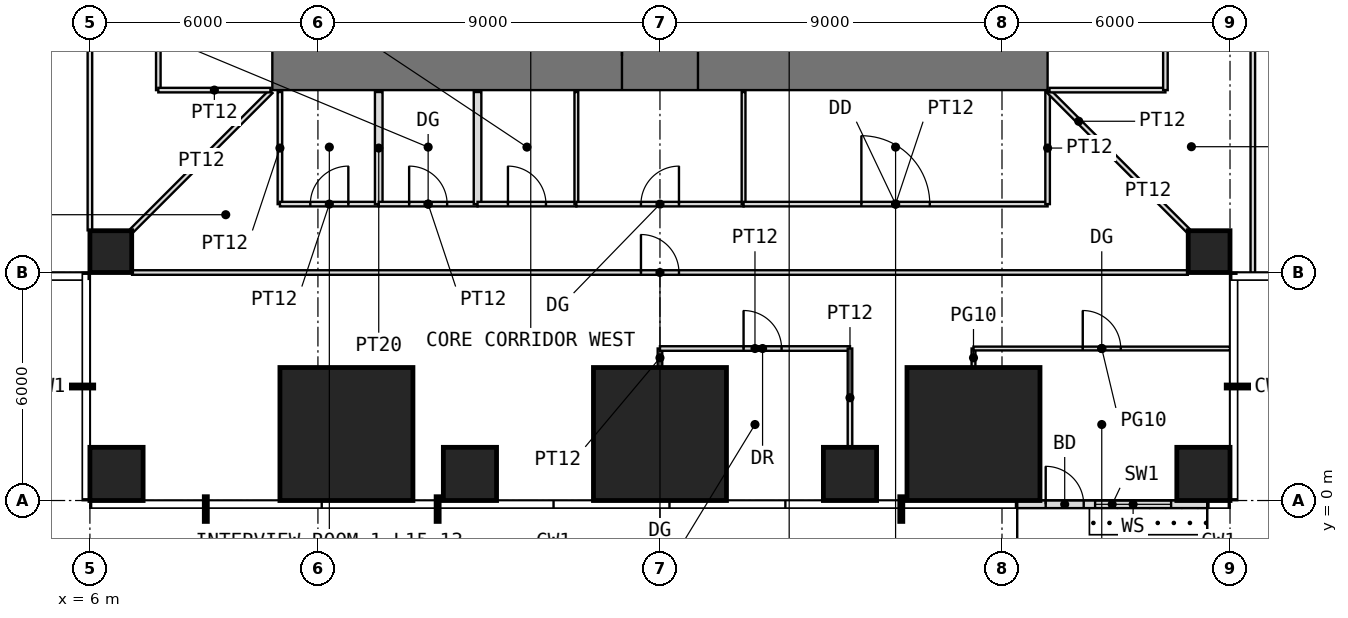
"""IFC4 building model, lengths in metres.
Left out: names, types, materials, properties, quantities, classifications, styles, units other than length and angle.
Written with IfcOpenShell. Run it as: python <this file> out.ifc"""

import sys

from ifc_helpers import new_model, si_unit, direction, frame, frame_2d, origin, origin_2d, place, context, subcontext, project, spatial, rectangle, extrude, element, fill, save


model = new_model("IFC4")
c1 = context("Model", 3, precision=1e-05, world=origin(), true_north=direction((0.0, 1.0)))
c2 = subcontext(c1, "Body", "Model", "MODEL_VIEW")
j1 = project(units=[si_unit("LENGTHUNIT", "METRE"), si_unit("PLANEANGLEUNIT", "RADIAN")], contexts=[c1])
p1 = place(None, origin())
s1 = spatial("IfcSite", under=j1, at=p1, CompositionType="ELEMENT")
p2 = place(p1, origin())
s2 = spatial("IfcBuilding", under=s1, at=p2, CompositionType="ELEMENT")
p3 = place(p2, frame((0.0, 0.0, 66.5)))
s3 = spatial("IfcBuildingStorey", under=s2, at=p3, CompositionType="ELEMENT", Elevation=66.5)
p4 = place(p3, frame((6.7, 0.7, 0.0), z_axis=(0.0, 0.0, 1.0), x_axis=(1.0, 0.0, 0.0)))
e1 = element("IfcColumn", 1, at=p4, inside=s3, PredefinedType="COLUMN", context=c2, shape_type="SweptSolid", body=[
    extrude(rectangle(XDim=1.4, YDim=1.4, at=origin_2d()), origin(), (0.0, 0.0, 1.0), 4.0),
])
p5 = place(p3, frame((12.75, 1.75, 0.0), z_axis=(0.0, 0.0, 1.0), x_axis=(1.0, 0.0, 0.0)))
e2 = element("IfcColumn", 2, at=p5, inside=s3, PredefinedType="COLUMN", context=c2, shape_type="SweptSolid", body=[
    extrude(rectangle(XDim=3.5, YDim=3.5, at=origin_2d()), origin(), (0.0, 0.0, 1.0), 4.0),
])
p6 = place(p3, frame((16.0, 0.7, 0.0), z_axis=(0.0, 0.0, 1.0), x_axis=(1.0, 0.0, 0.0)))
e3 = element("IfcColumn", 3, at=p6, inside=s3, PredefinedType="COLUMN", context=c2, shape_type="SweptSolid", body=[
    extrude(rectangle(XDim=1.4, YDim=1.4, at=origin_2d()), origin(), (0.0, 0.0, 1.0), 4.0),
])
p7 = place(p3, frame((21.0, 1.75, 0.0), z_axis=(0.0, 0.0, 1.0), x_axis=(1.0, 0.0, 0.0)))
e4 = element("IfcColumn", 4, at=p7, inside=s3, PredefinedType="COLUMN", context=c2, shape_type="SweptSolid", body=[
    extrude(rectangle(XDim=3.5, YDim=3.5, at=origin_2d()), origin(), (0.0, 0.0, 1.0), 4.0),
])
p8 = place(p3, frame((26.0, 0.7, 0.0), z_axis=(0.0, 0.0, 1.0), x_axis=(1.0, 0.0, 0.0)))
e5 = element("IfcColumn", 5, at=p8, inside=s3, PredefinedType="COLUMN", context=c2, shape_type="SweptSolid", body=[
    extrude(rectangle(XDim=1.4, YDim=1.4, at=origin_2d()), origin(), (0.0, 0.0, 1.0), 4.0),
])
p9 = place(p3, frame((29.25, 1.75, 0.0), z_axis=(0.0, 0.0, 1.0), x_axis=(1.0, 0.0, 0.0)))
e6 = element("IfcColumn", 6, at=p9, inside=s3, PredefinedType="COLUMN", context=c2, shape_type="SweptSolid", body=[
    extrude(rectangle(XDim=3.5, YDim=3.5, at=origin_2d()), origin(), (0.0, 0.0, 1.0), 4.0),
])
p10 = place(p3, frame((35.3, 0.7, 0.0), z_axis=(0.0, 0.0, 1.0), x_axis=(1.0, 0.0, 0.0)))
e7 = element("IfcColumn", 7, at=p10, inside=s3, PredefinedType="COLUMN", context=c2, shape_type="SweptSolid", body=[
    extrude(rectangle(XDim=1.4, YDim=1.4, at=origin_2d()), origin(), (0.0, 0.0, 1.0), 4.0),
])
for number, where, z_axis, x_axis in (
    (8, (6.55, 6.55, 0.0), (0.0, 0.0, 1.0), (1.0, 0.0, 0.0)),
    (9, (35.45, 6.55, 0.0), (0.0, 0.0, 1.0), (1.0, 0.0, 0.0)),
):
    element("IfcColumn", number, at=place(p3, frame(where, z_axis=z_axis, x_axis=x_axis)), inside=s3, PredefinedType="COLUMN", context=c2, shape_type="SweptSolid", body=[
        extrude(rectangle(XDim=1.1, YDim=1.1, at=origin_2d()), origin(), (0.0, 0.0, 1.0), 4.0),
    ])
p11 = place(p3, frame((30.4, -0.1, 0.0), z_axis=(0.0, 0.0, 1.0), x_axis=(1.0, 0.0, 0.0)))
e10 = element("IfcWall", 10, at=p11, inside=s3, PredefinedType="USERDEFINED", context=c2, shape_type="SweptSolid", body=[
    extrude(rectangle(XDim=5.0, YDim=0.2, at=frame_2d((2.5, 0.0))), origin(), (0.0, 0.0, 1.0), 3.75),
])
p12 = place(p11, frame((0.75, 0.0, 0.0)))
e11 = element("IfcOpeningElement", 11, at=p12, cuts=e10, PredefinedType="OPENING", context=c2, shape_type="SweptSolid", body=[
    extrude(rectangle(XDim=1.0, YDim=2.4, at=frame_2d((0.5, 1.2))), frame((0.0, 0.11, 0.0), z_axis=(0.0, -1.0, 0.0), x_axis=(1.0, 0.0, 0.0)), (0.0, 0.0, 1.0), 0.22),
])
p13 = place(p11, frame((2.05, 0.0, 0.3)))
e12 = element("IfcOpeningElement", 12, at=p13, cuts=e10, PredefinedType="OPENING", context=c2, shape_type="SweptSolid", body=[
    extrude(rectangle(XDim=2.0, YDim=2.7, at=frame_2d((1.0, 1.35))), frame((0.0, 0.11, 0.0), z_axis=(0.0, -1.0, 0.0), x_axis=(1.0, 0.0, 0.0)), (0.0, 0.0, 1.0), 0.22),
])
p14 = place(p3, frame((10.8, 11.7, -0.05), z_axis=(0.0, 0.0, 1.0), x_axis=(1.0, 0.0, 0.0)))
e13 = element("IfcWall", 13, at=p14, inside=s3, PredefinedType="SHEAR", context=c2, shape_type="SweptSolid", body=[
    extrude(rectangle(XDim=20.4, YDim=1.8, at=frame_2d((10.2, 0.0))), origin(), (0.0, 0.0, 1.0), 4.0),
])
p15 = place(p14, frame((9.2, 0.0, 0.05)))
e14 = element("IfcOpeningElement", 14, at=p15, cuts=e13, PredefinedType="OPENING", context=c2, shape_type="SweptSolid", body=[
    extrude(rectangle(XDim=2.0, YDim=2.2, at=frame_2d((1.0, 1.1))), frame((0.0, 0.91, 0.0), z_axis=(0.0, -1.0, 0.0), x_axis=(1.0, 0.0, 0.0)), (0.0, 0.0, 1.0), 1.82),
])
p16 = place(p3, frame((6.0, 7.11, 0.0), z_axis=(0.0, 0.0, 1.0), x_axis=(0.0, 1.0, 0.0)))
e15 = element("IfcWall", 15, at=p16, inside=s3, PredefinedType="PARTITIONING", context=c2, shape_type="SweptSolid", body=[
    extrude(rectangle(XDim=27.78, YDim=0.12, at=frame_2d((13.89, 0.0))), origin(), (0.0, 0.0, 1.0), 3.75),
])
p17 = place(p16, frame((13.39, 0.0, 0.0)))
e16 = element("IfcOpeningElement", 16, at=p17, cuts=e15, PredefinedType="OPENING", context=c2, shape_type="SweptSolid", body=[
    extrude(rectangle(XDim=1.0, YDim=2.4, at=frame_2d((0.5, 1.2))), frame((0.0, 0.07, 0.0), z_axis=(0.0, -1.0, 0.0), x_axis=(1.0, 0.0, 0.0)), (0.0, 0.0, 1.0), 0.14),
])
p18 = place(p3, frame((7.11, 6.0, 0.0), z_axis=(0.0, 0.0, 1.0), x_axis=(1.0, 0.0, 0.0)))
e17 = element("IfcWall", 17, at=p18, inside=s3, PredefinedType="PARTITIONING", context=c2, shape_type="SweptSolid", body=[
    extrude(rectangle(XDim=27.78, YDim=0.12, at=frame_2d((13.89, 0.0))), origin(), (0.0, 0.0, 1.0), 3.75),
])
p19 = place(p18, frame((13.39, 0.0, 0.0)))
e18 = element("IfcOpeningElement", 18, at=p19, cuts=e17, PredefinedType="OPENING", context=c2, shape_type="SweptSolid", body=[
    extrude(rectangle(XDim=1.0, YDim=2.4, at=frame_2d((0.5, 1.2))), frame((0.0, 0.07, 0.0), z_axis=(0.0, -1.0, 0.0), x_axis=(1.0, 0.0, 0.0)), (0.0, 0.0, 1.0), 0.14),
])
p20 = place(p3, frame((7.11, 7.11, 0.0), z_axis=(0.0, 0.0, 1.0), x_axis=(0.707106781187, 0.707106781187, 0.0)))
e19 = element("IfcWall", 19, at=p20, inside=s3, PredefinedType="PARTITIONING", context=c2, shape_type="SweptSolid", body=[
    extrude(rectangle(XDim=5.168, YDim=0.12, at=frame_2d((2.584, 0.0))), origin(), (0.0, 0.0, 1.0), 3.75),
])
p21 = place(p3, frame((7.8, 10.8, 0.0), z_axis=(0.0, 0.0, 1.0), x_axis=(0.0, 1.0, 0.0)))
e20 = element("IfcWall", 20, at=p21, inside=s3, PredefinedType="PARTITIONING", context=c2, shape_type="SweptSolid", body=[
    extrude(rectangle(XDim=3.8, YDim=0.12, at=frame_2d((1.9, 0.0))), origin(), (0.0, 0.0, 1.0), 3.75),
])
p22 = place(p21, frame((1.4, 0.0, 0.0)))
e21 = element("IfcOpeningElement", 21, at=p22, cuts=e20, PredefinedType="OPENING", context=c2, shape_type="SweptSolid", body=[
    extrude(rectangle(XDim=1.0, YDim=2.4, at=frame_2d((0.5, 1.2))), frame((0.0, 0.07, 0.0), z_axis=(0.0, -1.0, 0.0), x_axis=(1.0, 0.0, 0.0)), (0.0, 0.0, 1.0), 0.14),
])
for number, where, z_axis, x_axis in (
    (22, (7.8, 10.8, 0.0), (0.0, 0.0, 1.0), (1.0, 0.0, 0.0)),
    (23, (11.0, 7.8, 0.0), (0.0, 0.0, 1.0), (0.0, 1.0, 0.0)),
):
    element("IfcWall", number, at=place(p3, frame(where, z_axis=z_axis, x_axis=x_axis)), inside=s3, PredefinedType="PARTITIONING", context=c2, shape_type="SweptSolid", body=[
        extrude(rectangle(XDim=2.95, YDim=0.12, at=frame_2d((1.475, 0.0))), origin(), (0.0, 0.0, 1.0), 3.75),
    ])
p23 = place(p3, frame((11.0, 7.8, 0.0), z_axis=(0.0, 0.0, 1.0), x_axis=(1.0, 0.0, 0.0)))
e24 = element("IfcWall", 24, at=p23, inside=s3, PredefinedType="PARTITIONING", context=c2, shape_type="SweptSolid", body=[
    extrude(rectangle(XDim=2.6, YDim=0.12, at=frame_2d((1.3, 0.0))), origin(), (0.0, 0.0, 1.0), 3.75),
])
p24 = place(p23, frame((0.8, 0.0, 0.0)))
e25 = element("IfcOpeningElement", 25, at=p24, cuts=e24, PredefinedType="OPENING", context=c2, shape_type="SweptSolid", body=[
    extrude(rectangle(XDim=1.0, YDim=2.4, at=frame_2d((0.5, 1.2))), frame((0.0, 0.07, 0.0), z_axis=(0.0, -1.0, 0.0), x_axis=(1.0, 0.0, 0.0)), (0.0, 0.0, 1.0), 0.14),
])
p25 = place(p3, frame((13.6, 7.8, 0.0), z_axis=(0.0, 0.0, 1.0), x_axis=(0.0, 1.0, 0.0)))
e26 = element("IfcWall", 26, at=p25, inside=s3, PredefinedType="PARTITIONING", context=c2, shape_type="SweptSolid", body=[
    extrude(rectangle(XDim=2.95, YDim=0.2, at=frame_2d((1.475, 0.0))), origin(), (0.0, 0.0, 1.0), 3.75),
])
p26 = place(p3, frame((13.6, 7.8, 0.0), z_axis=(0.0, 0.0, 1.0), x_axis=(1.0, 0.0, 0.0)))
e27 = element("IfcWall", 27, at=p26, inside=s3, PredefinedType="PARTITIONING", context=c2, shape_type="SweptSolid", body=[
    extrude(rectangle(XDim=2.6, YDim=0.12, at=frame_2d((1.3, 0.0))), origin(), (0.0, 0.0, 1.0), 3.75),
])
p27 = place(p26, frame((0.8, 0.0, 0.0)))
e28 = element("IfcOpeningElement", 28, at=p27, cuts=e27, PredefinedType="OPENING", context=c2, shape_type="SweptSolid", body=[
    extrude(rectangle(XDim=1.0, YDim=2.4, at=frame_2d((0.5, 1.2))), frame((0.0, 0.07, 0.0), z_axis=(0.0, -1.0, 0.0), x_axis=(1.0, 0.0, 0.0)), (0.0, 0.0, 1.0), 0.14),
])
p28 = place(p3, frame((16.2, 7.8, 0.0), z_axis=(0.0, 0.0, 1.0), x_axis=(0.0, 1.0, 0.0)))
e29 = element("IfcWall", 29, at=p28, inside=s3, PredefinedType="PARTITIONING", context=c2, shape_type="SweptSolid", body=[
    extrude(rectangle(XDim=2.95, YDim=0.2, at=frame_2d((1.475, 0.0))), origin(), (0.0, 0.0, 1.0), 3.75),
])
p29 = place(p3, frame((16.2, 7.8, 0.0), z_axis=(0.0, 0.0, 1.0), x_axis=(1.0, 0.0, 0.0)))
e30 = element("IfcWall", 30, at=p29, inside=s3, PredefinedType="PARTITIONING", context=c2, shape_type="SweptSolid", body=[
    extrude(rectangle(XDim=2.6, YDim=0.12, at=frame_2d((1.3, 0.0))), origin(), (0.0, 0.0, 1.0), 3.75),
])
p30 = place(p29, frame((0.8, 0.0, 0.0)))
e31 = element("IfcOpeningElement", 31, at=p30, cuts=e30, PredefinedType="OPENING", context=c2, shape_type="SweptSolid", body=[
    extrude(rectangle(XDim=1.0, YDim=2.4, at=frame_2d((0.5, 1.2))), frame((0.0, 0.07, 0.0), z_axis=(0.0, -1.0, 0.0), x_axis=(1.0, 0.0, 0.0)), (0.0, 0.0, 1.0), 0.14),
])
p31 = place(p3, frame((18.8, 7.8, 0.0), z_axis=(0.0, 0.0, 1.0), x_axis=(0.0, 1.0, 0.0)))
e32 = element("IfcWall", 32, at=p31, inside=s3, PredefinedType="PARTITIONING", context=c2, shape_type="SweptSolid", body=[
    extrude(rectangle(XDim=2.95, YDim=0.1, at=frame_2d((1.475, 0.0))), origin(), (0.0, 0.0, 1.0), 3.75),
])
p32 = place(p3, frame((18.8, 7.8, 0.0), z_axis=(0.0, 0.0, 1.0), x_axis=(1.0, 0.0, 0.0)))
e33 = element("IfcWall", 33, at=p32, inside=s3, PredefinedType="PARTITIONING", context=c2, shape_type="SweptSolid", body=[
    extrude(rectangle(XDim=4.4, YDim=0.12, at=frame_2d((2.2, 0.0))), origin(), (0.0, 0.0, 1.0), 3.75),
])
p33 = place(p32, frame((1.7, 0.0, 0.0)))
e34 = element("IfcOpeningElement", 34, at=p33, cuts=e33, PredefinedType="OPENING", context=c2, shape_type="SweptSolid", body=[
    extrude(rectangle(XDim=1.0, YDim=2.4, at=frame_2d((0.5, 1.2))), frame((0.0, 0.07, 0.0), z_axis=(0.0, -1.0, 0.0), x_axis=(1.0, 0.0, 0.0)), (0.0, 0.0, 1.0), 0.14),
])
p34 = place(p3, frame((21.0, 3.51, 0.0), z_axis=(0.0, 0.0, 1.0), x_axis=(0.0, 1.0, 0.0)))
e35 = element("IfcWall", 35, at=p34, inside=s3, PredefinedType="PARTITIONING", context=c2, shape_type="SweptSolid", body=[
    extrude(rectangle(XDim=0.49, YDim=0.12, at=frame_2d((0.245, 0.0))), origin(), (0.0, 0.0, 1.0), 3.75),
])
p35 = place(p3, frame((21.0, 4.0, 0.0), z_axis=(0.0, 0.0, 1.0), x_axis=(1.0, 0.0, 0.0)))
e36 = element("IfcWall", 36, at=p35, inside=s3, PredefinedType="PARTITIONING", context=c2, shape_type="SweptSolid", body=[
    extrude(rectangle(XDim=5.0, YDim=0.12, at=frame_2d((2.5, 0.0))), origin(), (0.0, 0.0, 1.0), 3.75),
])
p36 = place(p35, frame((2.2, 0.0, 0.0)))
e37 = element("IfcOpeningElement", 37, at=p36, cuts=e36, PredefinedType="OPENING", context=c2, shape_type="SweptSolid", body=[
    extrude(rectangle(XDim=1.0, YDim=2.2, at=frame_2d((0.5, 1.1))), frame((0.0, 0.07, 0.0), z_axis=(0.0, -1.0, 0.0), x_axis=(1.0, 0.0, 0.0)), (0.0, 0.0, 1.0), 0.14),
])
p37 = place(p3, frame((23.2, 7.8, 0.0), z_axis=(0.0, 0.0, 1.0), x_axis=(0.0, 1.0, 0.0)))
e38 = element("IfcWall", 38, at=p37, inside=s3, PredefinedType="PARTITIONING", context=c2, shape_type="SweptSolid", body=[
    extrude(rectangle(XDim=2.95, YDim=0.1, at=frame_2d((1.475, 0.0))), origin(), (0.0, 0.0, 1.0), 3.75),
])
p38 = place(p3, frame((23.2, 7.8, 0.0), z_axis=(0.0, 0.0, 1.0), x_axis=(1.0, 0.0, 0.0)))
e39 = element("IfcWall", 39, at=p38, inside=s3, PredefinedType="PARTITIONING", context=c2, shape_type="SweptSolid", body=[
    extrude(rectangle(XDim=8.0, YDim=0.12, at=frame_2d((4.0, 0.0))), origin(), (0.0, 0.0, 1.0), 3.75),
])
p39 = place(p38, frame((3.1, 0.0, 0.0)))
e40 = element("IfcOpeningElement", 40, at=p39, cuts=e39, PredefinedType="OPENING", context=c2, shape_type="SweptSolid", body=[
    extrude(rectangle(XDim=1.8, YDim=2.4, at=frame_2d((0.9, 1.2))), frame((0.0, 0.07, 0.0), z_axis=(0.0, -1.0, 0.0), x_axis=(1.0, 0.0, 0.0)), (0.0, 0.0, 1.0), 0.14),
])
p40 = place(p3, frame((26.0, 1.41, 0.0), z_axis=(0.0, 0.0, 1.0), x_axis=(0.0, 1.0, 0.0)))
e41 = element("IfcWall", 41, at=p40, inside=s3, PredefinedType="PARTITIONING", context=c2, shape_type="SweptSolid", body=[
    extrude(rectangle(XDim=2.59, YDim=0.12, at=frame_2d((1.295, 0.0))), origin(), (0.0, 0.0, 1.0), 3.75),
])
p41 = place(p3, frame((29.25, 3.51, 0.0), z_axis=(0.0, 0.0, 1.0), x_axis=(0.0, 1.0, 0.0)))
e42 = element("IfcWall", 42, at=p41, inside=s3, PredefinedType="PARTITIONING", context=c2, shape_type="SweptSolid", body=[
    extrude(rectangle(XDim=0.49, YDim=0.1, at=frame_2d((0.245, 0.0))), origin(), (0.0, 0.0, 1.0), 3.75),
])
p42 = place(p3, frame((29.25, 4.0, 0.0), z_axis=(0.0, 0.0, 1.0), x_axis=(1.0, 0.0, 0.0)))
e43 = element("IfcWall", 43, at=p42, inside=s3, PredefinedType="PARTITIONING", context=c2, shape_type="SweptSolid", body=[
    extrude(rectangle(XDim=6.75, YDim=0.1, at=frame_2d((3.375, 0.0))), origin(), (0.0, 0.0, 1.0), 3.75),
])
p43 = place(p42, frame((2.875, 0.0, 0.0)))
e44 = element("IfcOpeningElement", 44, at=p43, cuts=e43, PredefinedType="OPENING", context=c2, shape_type="SweptSolid", body=[
    extrude(rectangle(XDim=1.0, YDim=2.4, at=frame_2d((0.5, 1.2))), frame((0.0, 0.06, 0.0), z_axis=(0.0, -1.0, 0.0), x_axis=(1.0, 0.0, 0.0)), (0.0, 0.0, 1.0), 0.12),
])
p44 = place(p3, frame((31.2, 7.8, 0.0), z_axis=(0.0, 0.0, 1.0), x_axis=(0.0, 1.0, 0.0)))
e45 = element("IfcWall", 45, at=p44, inside=s3, PredefinedType="PARTITIONING", context=c2, shape_type="SweptSolid", body=[
    extrude(rectangle(XDim=2.95, YDim=0.12, at=frame_2d((1.475, 0.0))), origin(), (0.0, 0.0, 1.0), 3.75),
])
p45 = place(p3, frame((31.235, 10.765, 0.0), z_axis=(0.0, 0.0, 1.0), x_axis=(0.707106781187, -0.707106781187, 0.0)))
e46 = element("IfcWall", 46, at=p45, inside=s3, PredefinedType="PARTITIONING", context=c2, shape_type="SweptSolid", body=[
    extrude(rectangle(XDim=2.218, YDim=0.12, at=frame_2d((1.109, 0.0))), origin(), (0.0, 0.0, 1.0), 3.75),
])
p46 = place(p3, frame((31.25, 10.8, 0.0), z_axis=(0.0, 0.0, 1.0), x_axis=(1.0, 0.0, 0.0)))
e47 = element("IfcWall", 47, at=p46, inside=s3, PredefinedType="PARTITIONING", context=c2, shape_type="SweptSolid", body=[
    extrude(rectangle(XDim=3.05, YDim=0.12, at=frame_2d((1.525, 0.0))), origin(), (0.0, 0.0, 1.0), 3.75),
])
p47 = place(p3, frame((32.804, 9.196, 0.0), z_axis=(0.0, 0.0, 1.0), x_axis=(0.707106781187, -0.707106781187, 0.0)))
e48 = element("IfcWall", 48, at=p47, inside=s3, PredefinedType="PARTITIONING", context=c2, shape_type="SweptSolid", body=[
    extrude(rectangle(XDim=2.95, YDim=0.12, at=frame_2d((1.475, 0.0))), origin(), (0.0, 0.0, 1.0), 3.75),
])
p48 = place(p3, frame((34.3, 10.8, 0.0), z_axis=(0.0, 0.0, 1.0), x_axis=(0.0, 1.0, 0.0)))
e49 = element("IfcWall", 49, at=p48, inside=s3, PredefinedType="PARTITIONING", context=c2, shape_type="SweptSolid", body=[
    extrude(rectangle(XDim=3.6, YDim=0.12, at=frame_2d((1.8, 0.0))), origin(), (0.0, 0.0, 1.0), 3.75),
])
p49 = place(p48, frame((1.3, 0.0, 0.0)))
e50 = element("IfcOpeningElement", 50, at=p49, cuts=e49, PredefinedType="OPENING", context=c2, shape_type="SweptSolid", body=[
    extrude(rectangle(XDim=1.0, YDim=2.2, at=frame_2d((0.5, 1.1))), frame((0.0, 0.07, 0.0), z_axis=(0.0, -1.0, 0.0), x_axis=(1.0, 0.0, 0.0)), (0.0, 0.0, 1.0), 0.14),
])
p50 = place(p3, frame((36.6, 6.0, 0.0), z_axis=(0.0, 0.0, 1.0), x_axis=(0.0, 1.0, 0.0)))
e51 = element("IfcWall", 51, at=p50, inside=s3, PredefinedType="PARTITIONING", context=c2, shape_type="SweptSolid", body=[
    extrude(rectangle(XDim=30.0, YDim=0.12, at=frame_2d((15.0, 0.0))), origin(), (0.0, 0.0, 1.0), 3.75),
])
p51 = place(p50, frame((14.5, 0.0, 0.0)))
e52 = element("IfcOpeningElement", 52, at=p51, cuts=e51, PredefinedType="OPENING", context=c2, shape_type="SweptSolid", body=[
    extrude(rectangle(XDim=1.0, YDim=2.4, at=frame_2d((0.5, 1.2))), frame((0.0, 0.07, 0.0), z_axis=(0.0, -1.0, 0.0), x_axis=(1.0, 0.0, 0.0)), (0.0, 0.0, 1.0), 0.14),
])
p52 = place(p12, origin())
e53 = element("IfcDoor", 53, at=p52, inside=s3, OperationType="SINGLE_SWING_LEFT", PredefinedType="DOOR", context=c2, shape_type="SweptSolid", body=[
    extrude(rectangle(XDim=1.0, YDim=2.4, at=frame_2d((0.5, 1.2))), frame((0.0, 0.025, 0.0), z_axis=(0.0, -1.0, 0.0), x_axis=(1.0, 0.0, 0.0)), (0.0, 0.0, 1.0), 0.05),
])
fill(e11, e53)
p53 = place(p13, origin())
e54 = element("IfcWindow", 54, at=p53, inside=s3, PartitioningType="SINGLE_PANEL", PredefinedType="WINDOW", context=c2, shape_type="SweptSolid", body=[
    extrude(rectangle(XDim=2.0, YDim=2.7, at=frame_2d((1.0, 1.35))), frame((0.0, 0.03, 0.0), z_axis=(0.0, -1.0, 0.0), x_axis=(1.0, 0.0, 0.0)), (0.0, 0.0, 1.0), 0.06),
])
fill(e12, e54)
p54 = place(p15, origin())
e55 = element("IfcDoor", 55, at=p54, inside=s3, OperationType="DOUBLE_DOOR_SINGLE_SWING", PredefinedType="DOOR", context=c2, shape_type="SweptSolid", body=[
    extrude(rectangle(XDim=2.0, YDim=2.2, at=frame_2d((1.0, 1.1))), frame((0.0, 0.025, 0.0), z_axis=(0.0, -1.0, 0.0), x_axis=(1.0, 0.0, 0.0)), (0.0, 0.0, 1.0), 0.05),
])
fill(e14, e55)
p55 = place(p24, origin())
e56 = element("IfcDoor", 56, at=p55, inside=s3, OperationType="SINGLE_SWING_RIGHT", PredefinedType="DOOR", context=c2, shape_type="SweptSolid", body=[
    extrude(rectangle(XDim=1.0, YDim=2.4, at=frame_2d((0.5, 1.2))), frame((0.0, 0.025, 0.0), z_axis=(0.0, -1.0, 0.0), x_axis=(1.0, 0.0, 0.0)), (0.0, 0.0, 1.0), 0.05),
])
fill(e25, e56)
p56 = place(p27, origin())
e57 = element("IfcDoor", 57, at=p56, inside=s3, OperationType="SINGLE_SWING_LEFT", PredefinedType="DOOR", context=c2, shape_type="SweptSolid", body=[
    extrude(rectangle(XDim=1.0, YDim=2.4, at=frame_2d((0.5, 1.2))), frame((0.0, 0.025, 0.0), z_axis=(0.0, -1.0, 0.0), x_axis=(1.0, 0.0, 0.0)), (0.0, 0.0, 1.0), 0.05),
])
fill(e28, e57)
p57 = place(p30, origin())
e58 = element("IfcDoor", 58, at=p57, inside=s3, OperationType="SINGLE_SWING_LEFT", PredefinedType="DOOR", context=c2, shape_type="SweptSolid", body=[
    extrude(rectangle(XDim=1.0, YDim=2.4, at=frame_2d((0.5, 1.2))), frame((0.0, 0.025, 0.0), z_axis=(0.0, -1.0, 0.0), x_axis=(1.0, 0.0, 0.0)), (0.0, 0.0, 1.0), 0.05),
])
fill(e31, e58)
p58 = place(p39, origin())
e59 = element("IfcDoor", 59, at=p58, inside=s3, OperationType="DOUBLE_DOOR_SINGLE_SWING", PredefinedType="DOOR", context=c2, shape_type="SweptSolid", body=[
    extrude(rectangle(XDim=1.8, YDim=2.4, at=frame_2d((0.9, 1.2))), frame((0.0, 0.025, 0.0), z_axis=(0.0, -1.0, 0.0), x_axis=(1.0, 0.0, 0.0)), (0.0, 0.0, 1.0), 0.05),
])
fill(e40, e59)
p59 = place(p36, origin())
e60 = element("IfcDoor", 60, at=p59, inside=s3, OperationType="SINGLE_SWING_LEFT", PredefinedType="DOOR", context=c2, shape_type="SweptSolid", body=[
    extrude(rectangle(XDim=1.0, YDim=2.2, at=frame_2d((0.5, 1.1))), frame((0.0, 0.025, 0.0), z_axis=(0.0, -1.0, 0.0), x_axis=(1.0, 0.0, 0.0)), (0.0, 0.0, 1.0), 0.05),
])
fill(e37, e60)
p60 = place(p43, origin())
e61 = element("IfcDoor", 61, at=p60, inside=s3, OperationType="SINGLE_SWING_LEFT", PredefinedType="DOOR", context=c2, shape_type="SweptSolid", body=[
    extrude(rectangle(XDim=1.0, YDim=2.4, at=frame_2d((0.5, 1.2))), frame((0.0, 0.025, 0.0), z_axis=(0.0, -1.0, 0.0), x_axis=(1.0, 0.0, 0.0)), (0.0, 0.0, 1.0), 0.05),
])
fill(e44, e61)
p61 = place(p19, origin())
e62 = element("IfcDoor", 62, at=p61, inside=s3, OperationType="SINGLE_SWING_LEFT", PredefinedType="DOOR", context=c2, shape_type="SweptSolid", body=[
    extrude(rectangle(XDim=1.0, YDim=2.4, at=frame_2d((0.5, 1.2))), frame((0.0, 0.025, 0.0), z_axis=(0.0, -1.0, 0.0), x_axis=(1.0, 0.0, 0.0)), (0.0, 0.0, 1.0), 0.05),
])
fill(e18, e62)
p62 = place(p33, origin())
e63 = element("IfcDoor", 63, at=p62, inside=s3, OperationType="SINGLE_SWING_RIGHT", PredefinedType="DOOR", context=c2, shape_type="SweptSolid", body=[
    extrude(rectangle(XDim=1.0, YDim=2.4, at=frame_2d((0.5, 1.2))), frame((0.0, 0.025, 0.0), z_axis=(0.0, -1.0, 0.0), x_axis=(1.0, 0.0, 0.0)), (0.0, 0.0, 1.0), 0.05),
])
fill(e34, e63)
save(model, sys.argv[1])
